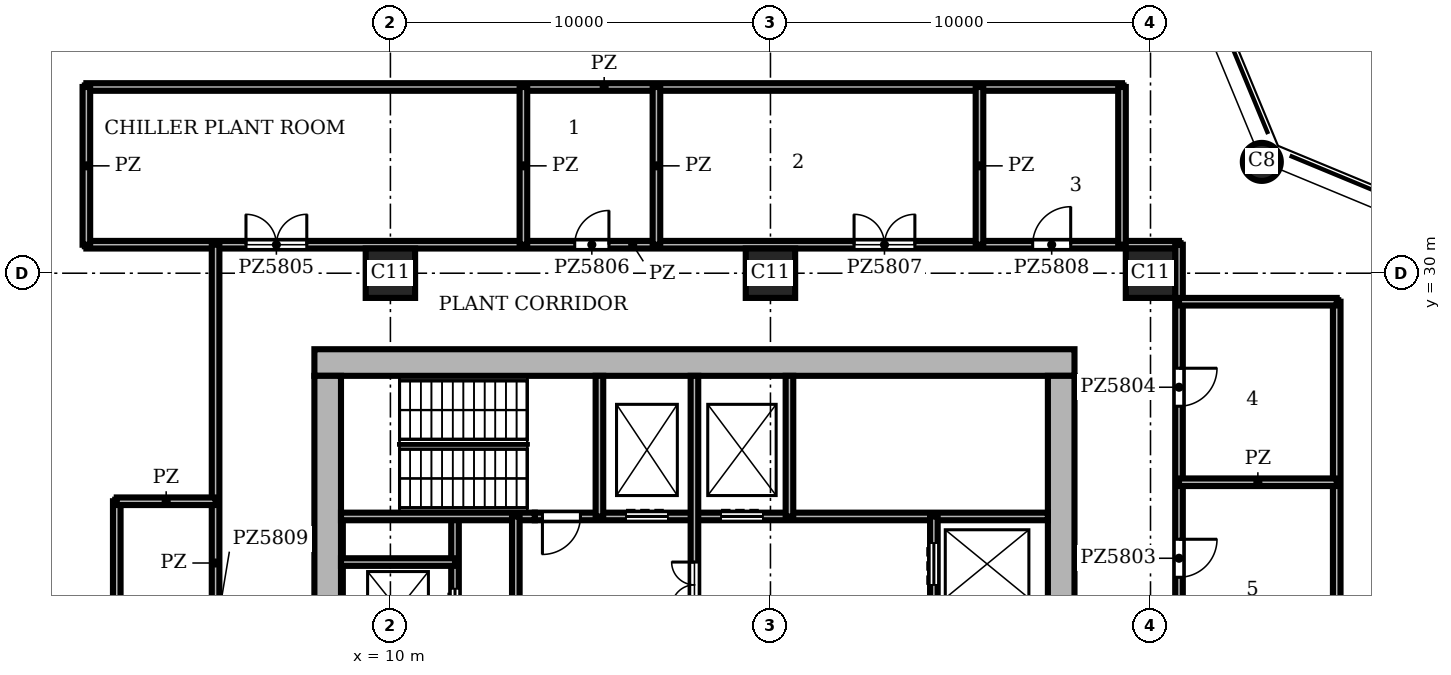
"""IFC4 building model, lengths in metres.
Left out: names, types, materials, properties, quantities, classifications, styles, units other than length and angle.
Written with IfcOpenShell. Run it as: python <this file> out.ifc"""

import sys

from ifc_helpers import new_model, si_unit, direction, frame, frame_2d, origin, origin_2d, place, context, subcontext, project, spatial, rectangle, circle, extrude, element, fill, save


model = new_model("IFC4")
c1 = context("Model", 3, precision=1e-05, world=origin(), true_north=direction((0.0, 1.0)))
c2 = subcontext(c1, "Body", "Model", "MODEL_VIEW")
j1 = project(units=[si_unit("LENGTHUNIT", "METRE"), si_unit("PLANEANGLEUNIT", "RADIAN")], contexts=[c1])
p1 = place(None, origin())
s1 = spatial("IfcSite", under=j1, at=p1, CompositionType="ELEMENT")
p2 = place(p1, origin())
s2 = spatial("IfcBuilding", under=s1, at=p2, CompositionType="ELEMENT")
p3 = place(p2, frame((0.0, 0.0, 237.0)))
s3 = spatial("IfcBuildingStorey", under=s2, at=p3, CompositionType="ELEMENT", Elevation=237.0)
p4 = place(p3, frame((32.929, 32.929, 0.0), z_axis=(0.0, 0.0, 1.0), x_axis=(1.0, 0.0, 0.0)))
e1 = element("IfcColumn", 1, at=p4, inside=s3, PredefinedType="COLUMN", context=c2, shape_type="SweptSolid", body=[
    extrude(circle(Radius=0.5, at=origin_2d()), origin(), (0.0, 0.0, 1.0), 9.0),
])
for number, where, z_axis, x_axis in (
    (2, (10.0, 30.0, 0.0), (0.0, 0.0, 1.0), (1.0, 0.0, 0.0)),
    (3, (20.0, 30.0, 0.0), (0.0, 0.0, 1.0), (1.0, 0.0, 0.0)),
    (4, (30.0, 30.0, 0.0), (0.0, 0.0, 1.0), (1.0, 0.0, 0.0)),
):
    element("IfcColumn", number, at=place(p3, frame(where, z_axis=z_axis, x_axis=x_axis)), inside=s3, PredefinedType="COLUMN", context=c2, shape_type="SweptSolid", body=[
        extrude(rectangle(XDim=1.3, YDim=1.3, at=origin_2d()), origin(), (0.0, 0.0, 1.0), 9.0),
    ])
p5 = place(p3, frame((27.65, 8.7, 0.0), z_axis=(0.0, 0.0, 1.0), x_axis=(0.0, 1.0, 0.0)))
e5 = element("IfcWall", 5, at=p5, inside=s3, PredefinedType="SHEAR", context=c2, shape_type="SweptSolid", body=[
    extrude(rectangle(XDim=18.6, YDim=0.7, at=frame_2d((9.3, 0.0))), origin(), (0.0, 0.0, 1.0), 9.0),
])
p6 = place(p5, frame((4.75, 0.0, 0.0)))
e6 = element("IfcOpeningElement", 6, at=p6, cuts=e5, PredefinedType="OPENING", context=c2, shape_type="SweptSolid", body=[
    extrude(rectangle(XDim=1.6, YDim=2.1, at=frame_2d((0.8, 1.05))), frame((0.0, 0.36, 0.0), z_axis=(0.0, -1.0, 0.0), x_axis=(1.0, 0.0, 0.0)), (0.0, 0.0, 1.0), 0.72),
])
p7 = place(p3, frame((28.0, 27.65, 0.0), z_axis=(0.0, 0.0, 1.0), x_axis=(-1.0, 0.0, 0.0)))
e7 = element("IfcWall", 7, at=p7, inside=s3, PredefinedType="SHEAR", context=c2, shape_type="SweptSolid", body=[
    extrude(rectangle(XDim=20.0, YDim=0.7, at=frame_2d((10.0, 0.0))), origin(), (0.0, 0.0, 1.0), 9.0),
])
p8 = place(p3, frame((8.35, 27.3, 0.0), z_axis=(0.0, 0.0, 1.0), x_axis=(0.0, -1.0, 0.0)))
e8 = element("IfcWall", 8, at=p8, inside=s3, PredefinedType="SHEAR", context=c2, shape_type="SweptSolid", body=[
    extrude(rectangle(XDim=18.6, YDim=0.7, at=frame_2d((9.3, 0.0))), origin(), (0.0, 0.0, 1.0), 9.0),
])
p9 = place(p3, frame((8.7, 22.4, 0.0), z_axis=(0.0, 0.0, 1.0), x_axis=(1.0, 0.0, 0.0)))
e9 = element("IfcWall", 9, at=p9, inside=s3, PredefinedType="SHEAR", context=c2, shape_type="SweptSolid", body=[
    extrude(rectangle(XDim=3.0, YDim=0.2, at=frame_2d((1.5, 0.0))), origin(), (0.0, 0.0, 1.0), 8.55),
])
p10 = place(p3, frame((8.7, 23.6, 0.0), z_axis=(0.0, 0.0, 1.0), x_axis=(1.0, 0.0, 0.0)))
e10 = element("IfcWall", 10, at=p10, inside=s3, PredefinedType="SHEAR", context=c2, shape_type="SweptSolid", body=[
    extrude(rectangle(XDim=5.1, YDim=0.2, at=frame_2d((2.55, 0.0))), origin(), (0.0, 0.0, 1.0), 8.55),
])
p11 = place(p3, frame((13.8, 23.6, 0.0), z_axis=(0.0, 0.0, 1.0), x_axis=(1.0, 0.0, 0.0)))
e11 = element("IfcWall", 11, at=p11, inside=s3, PredefinedType="SHEAR", context=c2, shape_type="SweptSolid", body=[
    extrude(rectangle(XDim=13.5, YDim=0.2, at=frame_2d((6.75, 0.0))), origin(), (0.0, 0.0, 1.0), 8.55),
])
p12 = place(p11, frame((2.4, 0.0, 0.0)))
e12 = element("IfcOpeningElement", 12, at=p12, cuts=e11, PredefinedType="OPENING", context=c2, shape_type="SweptSolid", body=[
    extrude(rectangle(XDim=1.1, YDim=2.1, at=frame_2d((0.55, 1.05))), frame((0.0, 0.11, 0.0), z_axis=(0.0, -1.0, 0.0), x_axis=(1.0, 0.0, 0.0)), (0.0, 0.0, 1.0), 0.22),
])
p13 = place(p11, frame((4.9, 0.0, 0.0)))
e13 = element("IfcOpeningElement", 13, at=p13, cuts=e11, PredefinedType="OPENING", context=c2, shape_type="SweptSolid", body=[
    extrude(rectangle(XDim=1.1, YDim=2.1, at=frame_2d((0.55, 1.05))), frame((0.0, 0.11, 0.0), z_axis=(0.0, -1.0, 0.0), x_axis=(1.0, 0.0, 0.0)), (0.0, 0.0, 1.0), 0.22),
])
p14 = place(p11, frame((0.2, 0.0, 0.0)))
e14 = element("IfcOpeningElement", 14, at=p14, cuts=e11, PredefinedType="OPENING", context=c2, shape_type="SweptSolid", body=[
    extrude(rectangle(XDim=1.0, YDim=2.1, at=frame_2d((0.5, 1.05))), frame((0.0, 0.11, 0.0), z_axis=(0.0, -1.0, 0.0), x_axis=(1.0, 0.0, 0.0)), (0.0, 0.0, 1.0), 0.22),
])
p15 = place(p3, frame((11.7, 12.4, 0.0), z_axis=(0.0, 0.0, 1.0), x_axis=(0.0, 1.0, 0.0)))
e15 = element("IfcWall", 15, at=p15, inside=s3, PredefinedType="SHEAR", context=c2, shape_type="SweptSolid", body=[
    extrude(rectangle(XDim=11.2, YDim=0.2, at=frame_2d((5.6, 0.0))), origin(), (0.0, 0.0, 1.0), 8.55),
])
p16 = place(p15, frame((0.7, 0.0, 0.0)))
e16 = element("IfcOpeningElement", 16, at=p16, cuts=e15, PredefinedType="OPENING", context=c2, shape_type="SweptSolid", body=[
    extrude(rectangle(XDim=1.1, YDim=2.1, at=frame_2d((0.55, 1.05))), frame((0.0, 0.11, 0.0), z_axis=(0.0, -1.0, 0.0), x_axis=(1.0, 0.0, 0.0)), (0.0, 0.0, 1.0), 0.22),
])
p17 = place(p15, frame((3.2, 0.0, 0.0)))
e17 = element("IfcOpeningElement", 17, at=p17, cuts=e15, PredefinedType="OPENING", context=c2, shape_type="SweptSolid", body=[
    extrude(rectangle(XDim=1.1, YDim=2.1, at=frame_2d((0.55, 1.05))), frame((0.0, 0.11, 0.0), z_axis=(0.0, -1.0, 0.0), x_axis=(1.0, 0.0, 0.0)), (0.0, 0.0, 1.0), 0.22),
])
p18 = place(p15, frame((5.7, 0.0, 0.0)))
e18 = element("IfcOpeningElement", 18, at=p18, cuts=e15, PredefinedType="OPENING", context=c2, shape_type="SweptSolid", body=[
    extrude(rectangle(XDim=1.1, YDim=2.1, at=frame_2d((0.55, 1.05))), frame((0.0, 0.11, 0.0), z_axis=(0.0, -1.0, 0.0), x_axis=(1.0, 0.0, 0.0)), (0.0, 0.0, 1.0), 0.22),
])
p19 = place(p15, frame((8.2, 0.0, 0.0)))
e19 = element("IfcOpeningElement", 19, at=p19, cuts=e15, PredefinedType="OPENING", context=c2, shape_type="SweptSolid", body=[
    extrude(rectangle(XDim=1.1, YDim=2.1, at=frame_2d((0.55, 1.05))), frame((0.0, 0.11, 0.0), z_axis=(0.0, -1.0, 0.0), x_axis=(1.0, 0.0, 0.0)), (0.0, 0.0, 1.0), 0.22),
])
p20 = place(p3, frame((13.3, 20.0, 0.0), z_axis=(0.0, 0.0, 1.0), x_axis=(0.0, 1.0, 0.0)))
e20 = element("IfcWall", 20, at=p20, inside=s3, PredefinedType="SHEAR", context=c2, shape_type="SweptSolid", body=[
    extrude(rectangle(XDim=3.6, YDim=0.2, at=frame_2d((1.8, 0.0))), origin(), (0.0, 0.0, 1.0), 8.55),
])
p21 = place(p3, frame((15.5, 23.6, 0.0), z_axis=(0.0, 0.0, 1.0), x_axis=(0.0, 1.0, 0.0)))
e21 = element("IfcWall", 21, at=p21, inside=s3, PredefinedType="SHEAR", context=c2, shape_type="SweptSolid", body=[
    extrude(rectangle(XDim=3.7, YDim=0.2, at=frame_2d((1.85, 0.0))), origin(), (0.0, 0.0, 1.0), 8.55),
])
p22 = place(p3, frame((18.0, 20.0, 0.0), z_axis=(0.0, 0.0, 1.0), x_axis=(0.0, 1.0, 0.0)))
e22 = element("IfcWall", 22, at=p22, inside=s3, PredefinedType="SHEAR", context=c2, shape_type="SweptSolid", body=[
    extrude(rectangle(XDim=7.3, YDim=0.2, at=frame_2d((3.65, 0.0))), origin(), (0.0, 0.0, 1.0), 8.55),
])
p23 = place(p22, frame((1.2, 0.0, 0.0)))
e23 = element("IfcOpeningElement", 23, at=p23, cuts=e22, PredefinedType="OPENING", context=c2, shape_type="SweptSolid", body=[
    extrude(rectangle(XDim=1.2, YDim=2.1, at=frame_2d((0.6, 1.05))), frame((0.0, 0.11, 0.0), z_axis=(0.0, -1.0, 0.0), x_axis=(1.0, 0.0, 0.0)), (0.0, 0.0, 1.0), 0.22),
])
p24 = place(p3, frame((20.5, 23.6, 0.0), z_axis=(0.0, 0.0, 1.0), x_axis=(0.0, 1.0, 0.0)))
e24 = element("IfcWall", 24, at=p24, inside=s3, PredefinedType="SHEAR", context=c2, shape_type="SweptSolid", body=[
    extrude(rectangle(XDim=3.7, YDim=0.2, at=frame_2d((1.85, 0.0))), origin(), (0.0, 0.0, 1.0), 8.55),
])
p25 = place(p3, frame((24.3, 16.1, 0.0), z_axis=(0.0, 0.0, 1.0), x_axis=(0.0, 1.0, 0.0)))
e25 = element("IfcWall", 25, at=p25, inside=s3, PredefinedType="SHEAR", context=c2, shape_type="SweptSolid", body=[
    extrude(rectangle(XDim=7.5, YDim=0.2, at=frame_2d((3.75, 0.0))), origin(), (0.0, 0.0, 1.0), 8.55),
])
p26 = place(p25, frame((5.7, 0.0, 0.0)))
e26 = element("IfcOpeningElement", 26, at=p26, cuts=e25, PredefinedType="OPENING", context=c2, shape_type="SweptSolid", body=[
    extrude(rectangle(XDim=1.1, YDim=2.1, at=frame_2d((0.55, 1.05))), frame((0.0, 0.11, 0.0), z_axis=(0.0, -1.0, 0.0), x_axis=(1.0, 0.0, 0.0)), (0.0, 0.0, 1.0), 0.22),
])
p27 = place(p3, frame((8.8, 22.2, 7.5), z_axis=(0.0, 0.0, 1.0), x_axis=(1.0, 0.0, 0.0)))
e27 = element("IfcWall", 27, at=p27, inside=s3, PredefinedType="SOLIDWALL", context=c2, shape_type="SweptSolid", body=[
    extrude(rectangle(XDim=2.8, YDim=0.2, at=frame_2d((1.4, 0.0))), origin(), (0.0, 0.0, 1.0), 1.5),
])
for number, where, z_axis, x_axis in (
    (28, (8.9, 20.2, 7.5), (0.0, 0.0, 1.0), (0.0, 1.0, 0.0)),
    (29, (11.5, 20.2, 7.5), (0.0, 0.0, 1.0), (0.0, 1.0, 0.0)),
):
    element("IfcWall", number, at=place(p3, frame(where, z_axis=z_axis, x_axis=x_axis)), inside=s3, PredefinedType="SOLIDWALL", context=c2, shape_type="SweptSolid", body=[
        extrude(rectangle(XDim=1.9, YDim=0.2, at=frame_2d((0.95, 0.0))), origin(), (0.0, 0.0, 1.0), 1.5),
    ])
p28 = place(p3, frame((2.0, 30.75, 0.0), z_axis=(0.0, 0.0, 1.0), x_axis=(1.0, 0.0, 0.0)))
e30 = element("IfcWall", 30, at=p28, inside=s3, PredefinedType="PARTITIONING", context=c2, shape_type="SweptSolid", body=[
    extrude(rectangle(XDim=28.75, YDim=0.2, at=frame_2d((14.375, 0.0))), origin(), (0.0, 0.0, 1.0), 8.55),
])
p29 = place(p28, frame((4.2, 0.0, 0.0)))
e31 = element("IfcOpeningElement", 31, at=p29, cuts=e30, PredefinedType="OPENING", context=c2, shape_type="SweptSolid", body=[
    extrude(rectangle(XDim=1.6, YDim=2.1, at=frame_2d((0.8, 1.05))), frame((0.0, 0.11, 0.0), z_axis=(0.0, -1.0, 0.0), x_axis=(1.0, 0.0, 0.0)), (0.0, 0.0, 1.0), 0.22),
])
p30 = place(p28, frame((12.85, 0.0, 0.0)))
e32 = element("IfcOpeningElement", 32, at=p30, cuts=e30, PredefinedType="OPENING", context=c2, shape_type="SweptSolid", body=[
    extrude(rectangle(XDim=0.9, YDim=2.1, at=frame_2d((0.45, 1.05))), frame((0.0, 0.11, 0.0), z_axis=(0.0, -1.0, 0.0), x_axis=(1.0, 0.0, 0.0)), (0.0, 0.0, 1.0), 0.22),
])
p31 = place(p28, frame((20.2, 0.0, 0.0)))
e33 = element("IfcOpeningElement", 33, at=p31, cuts=e30, PredefinedType="OPENING", context=c2, shape_type="SweptSolid", body=[
    extrude(rectangle(XDim=1.6, YDim=2.1, at=frame_2d((0.8, 1.05))), frame((0.0, 0.11, 0.0), z_axis=(0.0, -1.0, 0.0), x_axis=(1.0, 0.0, 0.0)), (0.0, 0.0, 1.0), 0.22),
])
p32 = place(p28, frame((24.9, 0.0, 0.0)))
e34 = element("IfcOpeningElement", 34, at=p32, cuts=e30, PredefinedType="OPENING", context=c2, shape_type="SweptSolid", body=[
    extrude(rectangle(XDim=1.0, YDim=2.1, at=frame_2d((0.5, 1.05))), frame((0.0, 0.11, 0.0), z_axis=(0.0, -1.0, 0.0), x_axis=(1.0, 0.0, 0.0)), (0.0, 0.0, 1.0), 0.22),
])
p33 = place(p3, frame((2.0, 34.9, 0.0), z_axis=(0.0, 0.0, 1.0), x_axis=(1.0, 0.0, 0.0)))
e35 = element("IfcWall", 35, at=p33, inside=s3, PredefinedType="PARTITIONING", context=c2, shape_type="SweptSolid", body=[
    extrude(rectangle(XDim=27.25, YDim=0.2, at=frame_2d((13.625, 0.0))), origin(), (0.0, 0.0, 1.0), 8.55),
])
p34 = place(p3, frame((2.8, 24.0, 0.0), z_axis=(0.0, 0.0, 1.0), x_axis=(1.0, 0.0, 0.0)))
e36 = element("IfcWall", 36, at=p34, inside=s3, PredefinedType="PARTITIONING", context=c2, shape_type="SweptSolid", body=[
    extrude(rectangle(XDim=2.6, YDim=0.2, at=frame_2d((1.3, 0.0))), origin(), (0.0, 0.0, 1.0), 8.55),
])
for number, where, z_axis, x_axis in (
    (37, (30.75, 24.5, 0.0), (0.0, 0.0, 1.0), (1.0, 0.0, 0.0)),
    (38, (30.75, 29.25, 0.0), (0.0, 0.0, 1.0), (1.0, 0.0, 0.0)),
    (39, (2.0, 30.75, 0.0), (0.0, 0.0, 1.0), (0.0, 1.0, 0.0)),
):
    element("IfcWall", number, at=place(p3, frame(where, z_axis=z_axis, x_axis=x_axis)), inside=s3, PredefinedType="PARTITIONING", context=c2, shape_type="SweptSolid", body=[
        extrude(rectangle(XDim=4.15, YDim=0.2, at=frame_2d((2.075, 0.0))), origin(), (0.0, 0.0, 1.0), 8.55),
    ])
p35 = place(p3, frame((2.8, 17.0, 0.0), z_axis=(0.0, 0.0, 1.0), x_axis=(0.0, 1.0, 0.0)))
e40 = element("IfcWall", 40, at=p35, inside=s3, PredefinedType="PARTITIONING", context=c2, shape_type="SweptSolid", body=[
    extrude(rectangle(XDim=7.0, YDim=0.2, at=frame_2d((3.5, 0.0))), origin(), (0.0, 0.0, 1.0), 8.55),
])
p36 = place(p3, frame((5.4, 14.0, 0.0), z_axis=(0.0, 0.0, 1.0), x_axis=(0.0, 1.0, 0.0)))
e41 = element("IfcWall", 41, at=p36, inside=s3, PredefinedType="PARTITIONING", context=c2, shape_type="SweptSolid", body=[
    extrude(rectangle(XDim=16.75, YDim=0.2, at=frame_2d((8.375, 0.0))), origin(), (0.0, 0.0, 1.0), 8.55),
])
p37 = place(p36, frame((6.0, 0.0, 0.0)))
e42 = element("IfcOpeningElement", 42, at=p37, cuts=e41, PredefinedType="OPENING", context=c2, shape_type="SweptSolid", body=[
    extrude(rectangle(XDim=1.0, YDim=2.1, at=frame_2d((0.5, 1.05))), frame((0.0, 0.11, 0.0), z_axis=(0.0, -1.0, 0.0), x_axis=(1.0, 0.0, 0.0)), (0.0, 0.0, 1.0), 0.22),
])
for number, where, z_axis, x_axis in (
    (43, (13.5, 30.75, 0.0), (0.0, 0.0, 1.0), (0.0, 1.0, 0.0)),
    (44, (17.0, 30.75, 0.0), (0.0, 0.0, 1.0), (0.0, 1.0, 0.0)),
    (45, (25.5, 30.75, 0.0), (0.0, 0.0, 1.0), (0.0, 1.0, 0.0)),
    (46, (29.25, 30.75, 0.0), (0.0, 0.0, 1.0), (0.0, 1.0, 0.0)),
):
    element("IfcWall", number, at=place(p3, frame(where, z_axis=z_axis, x_axis=x_axis)), inside=s3, PredefinedType="PARTITIONING", context=c2, shape_type="SweptSolid", body=[
        extrude(rectangle(XDim=4.15, YDim=0.2, at=frame_2d((2.075, 0.0))), origin(), (0.0, 0.0, 1.0), 8.55),
    ])
p38 = place(p3, frame((30.75, 8.1, 0.0), z_axis=(0.0, 0.0, 1.0), x_axis=(0.0, 1.0, 0.0)))
e47 = element("IfcWall", 47, at=p38, inside=s3, PredefinedType="PARTITIONING", context=c2, shape_type="SweptSolid", body=[
    extrude(rectangle(XDim=22.65, YDim=0.2, at=frame_2d((11.325, 0.0))), origin(), (0.0, 0.0, 1.0), 8.55),
])
p39 = place(p38, frame((3.6, 0.0, 0.0)))
e48 = element("IfcOpeningElement", 48, at=p39, cuts=e47, PredefinedType="OPENING", context=c2, shape_type="SweptSolid", body=[
    extrude(rectangle(XDim=1.0, YDim=2.1, at=frame_2d((0.5, 1.05))), frame((0.0, 0.11, 0.0), z_axis=(0.0, -1.0, 0.0), x_axis=(1.0, 0.0, 0.0)), (0.0, 0.0, 1.0), 0.22),
])
p40 = place(p38, frame((7.7, 0.0, 0.0)))
e49 = element("IfcOpeningElement", 49, at=p40, cuts=e47, PredefinedType="OPENING", context=c2, shape_type="SweptSolid", body=[
    extrude(rectangle(XDim=1.2, YDim=2.1, at=frame_2d((0.6, 1.05))), frame((0.0, 0.11, 0.0), z_axis=(0.0, -1.0, 0.0), x_axis=(1.0, 0.0, 0.0)), (0.0, 0.0, 1.0), 0.22),
])
p41 = place(p38, frame((13.9, 0.0, 0.0)))
e50 = element("IfcOpeningElement", 50, at=p41, cuts=e47, PredefinedType="OPENING", context=c2, shape_type="SweptSolid", body=[
    extrude(rectangle(XDim=1.0, YDim=2.1, at=frame_2d((0.5, 1.05))), frame((0.0, 0.11, 0.0), z_axis=(0.0, -1.0, 0.0), x_axis=(1.0, 0.0, 0.0)), (0.0, 0.0, 1.0), 0.22),
])
p42 = place(p38, frame((18.4, 0.0, 0.0)))
e51 = element("IfcOpeningElement", 51, at=p42, cuts=e47, PredefinedType="OPENING", context=c2, shape_type="SweptSolid", body=[
    extrude(rectangle(XDim=1.0, YDim=2.1, at=frame_2d((0.5, 1.05))), frame((0.0, 0.11, 0.0), z_axis=(0.0, -1.0, 0.0), x_axis=(1.0, 0.0, 0.0)), (0.0, 0.0, 1.0), 0.22),
])
p43 = place(p3, frame((34.9, 8.1, 0.0), z_axis=(0.0, 0.0, 1.0), x_axis=(0.0, 1.0, 0.0)))
e52 = element("IfcWall", 52, at=p43, inside=s3, PredefinedType="PARTITIONING", context=c2, shape_type="SweptSolid", body=[
    extrude(rectangle(XDim=21.15, YDim=0.2, at=frame_2d((10.575, 0.0))), origin(), (0.0, 0.0, 1.0), 8.55),
])
p44 = place(p19, origin())
e53 = element("IfcDoor", 53, at=p44, inside=s3, OperationType="DOUBLE_DOOR_SLIDING", PredefinedType="DOOR", context=c2, shape_type="SweptSolid", body=[
    extrude(rectangle(XDim=1.1, YDim=2.1, at=frame_2d((0.55, 1.05))), frame((0.0, 0.025, 0.0), z_axis=(0.0, -1.0, 0.0), x_axis=(1.0, 0.0, 0.0)), (0.0, 0.0, 1.0), 0.05),
])
fill(e19, e53)
p45 = place(p26, origin())
e54 = element("IfcDoor", 54, at=p45, inside=s3, OperationType="DOUBLE_DOOR_SLIDING", PredefinedType="DOOR", context=c2, shape_type="SweptSolid", body=[
    extrude(rectangle(XDim=1.1, YDim=2.1, at=frame_2d((0.55, 1.05))), frame((0.0, 0.025, 0.0), z_axis=(0.0, -1.0, 0.0), x_axis=(1.0, 0.0, 0.0)), (0.0, 0.0, 1.0), 0.05),
])
fill(e26, e54)
p46 = place(p12, origin())
e55 = element("IfcDoor", 55, at=p46, inside=s3, OperationType="DOUBLE_DOOR_SLIDING", PredefinedType="DOOR", context=c2, shape_type="SweptSolid", body=[
    extrude(rectangle(XDim=1.1, YDim=2.1, at=frame_2d((0.55, 1.05))), frame((0.0, 0.025, 0.0), z_axis=(0.0, -1.0, 0.0), x_axis=(1.0, 0.0, 0.0)), (0.0, 0.0, 1.0), 0.05),
])
fill(e12, e55)
p47 = place(p13, origin())
e56 = element("IfcDoor", 56, at=p47, inside=s3, OperationType="DOUBLE_DOOR_SLIDING", PredefinedType="DOOR", context=c2, shape_type="SweptSolid", body=[
    extrude(rectangle(XDim=1.1, YDim=2.1, at=frame_2d((0.55, 1.05))), frame((0.0, 0.025, 0.0), z_axis=(0.0, -1.0, 0.0), x_axis=(1.0, 0.0, 0.0)), (0.0, 0.0, 1.0), 0.05),
])
fill(e13, e56)
p48 = place(p14, frame((1.0, 0.0, 0.0), z_axis=(0.0, 0.0, 1.0), x_axis=(-1.0, 0.0, 0.0)))
e57 = element("IfcDoor", 57, at=p48, inside=s3, OperationType="SINGLE_SWING_RIGHT", PredefinedType="DOOR", context=c2, shape_type="SweptSolid", body=[
    extrude(rectangle(XDim=1.0, YDim=2.1, at=frame_2d((0.5, 1.05))), frame((0.0, 0.025, 0.0), z_axis=(0.0, -1.0, 0.0), x_axis=(1.0, 0.0, 0.0)), (0.0, 0.0, 1.0), 0.05),
])
fill(e14, e57)
p49 = place(p23, origin())
e58 = element("IfcDoor", 58, at=p49, inside=s3, OperationType="DOUBLE_DOOR_SINGLE_SWING", PredefinedType="DOOR", context=c2, shape_type="SweptSolid", body=[
    extrude(rectangle(XDim=1.2, YDim=2.1, at=frame_2d((0.6, 1.05))), frame((0.0, 0.025, 0.0), z_axis=(0.0, -1.0, 0.0), x_axis=(1.0, 0.0, 0.0)), (0.0, 0.0, 1.0), 0.05),
])
fill(e23, e58)
p50 = place(p41, frame((1.0, 0.0, 0.0), z_axis=(0.0, 0.0, 1.0), x_axis=(-1.0, 0.0, 0.0)))
e59 = element("IfcDoor", 59, at=p50, inside=s3, OperationType="SINGLE_SWING_LEFT", PredefinedType="DOOR", context=c2, shape_type="SweptSolid", body=[
    extrude(rectangle(XDim=1.0, YDim=2.1, at=frame_2d((0.5, 1.05))), frame((0.0, 0.025, 0.0), z_axis=(0.0, -1.0, 0.0), x_axis=(1.0, 0.0, 0.0)), (0.0, 0.0, 1.0), 0.05),
])
fill(e50, e59)
p51 = place(p42, frame((1.0, 0.0, 0.0), z_axis=(0.0, 0.0, 1.0), x_axis=(-1.0, 0.0, 0.0)))
e60 = element("IfcDoor", 60, at=p51, inside=s3, OperationType="SINGLE_SWING_LEFT", PredefinedType="DOOR", context=c2, shape_type="SweptSolid", body=[
    extrude(rectangle(XDim=1.0, YDim=2.1, at=frame_2d((0.5, 1.05))), frame((0.0, 0.025, 0.0), z_axis=(0.0, -1.0, 0.0), x_axis=(1.0, 0.0, 0.0)), (0.0, 0.0, 1.0), 0.05),
])
fill(e51, e60)
p52 = place(p29, origin())
e61 = element("IfcDoor", 61, at=p52, inside=s3, OperationType="DOUBLE_DOOR_DOUBLE_SWING", PredefinedType="DOOR", context=c2, shape_type="SweptSolid", body=[
    extrude(rectangle(XDim=1.6, YDim=2.1, at=frame_2d((0.8, 1.05))), frame((0.0, 0.025, 0.0), z_axis=(0.0, -1.0, 0.0), x_axis=(1.0, 0.0, 0.0)), (0.0, 0.0, 1.0), 0.05),
])
fill(e31, e61)
p53 = place(p30, origin())
e62 = element("IfcDoor", 62, at=p53, inside=s3, OperationType="SINGLE_SWING_RIGHT", PredefinedType="DOOR", context=c2, shape_type="SweptSolid", body=[
    extrude(rectangle(XDim=0.9, YDim=2.1, at=frame_2d((0.45, 1.05))), frame((0.0, 0.025, 0.0), z_axis=(0.0, -1.0, 0.0), x_axis=(1.0, 0.0, 0.0)), (0.0, 0.0, 1.0), 0.05),
])
fill(e32, e62)
p54 = place(p31, origin())
e63 = element("IfcDoor", 63, at=p54, inside=s3, OperationType="DOUBLE_DOOR_DOUBLE_SWING", PredefinedType="DOOR", context=c2, shape_type="SweptSolid", body=[
    extrude(rectangle(XDim=1.6, YDim=2.1, at=frame_2d((0.8, 1.05))), frame((0.0, 0.025, 0.0), z_axis=(0.0, -1.0, 0.0), x_axis=(1.0, 0.0, 0.0)), (0.0, 0.0, 1.0), 0.05),
])
fill(e33, e63)
p55 = place(p32, origin())
e64 = element("IfcDoor", 64, at=p55, inside=s3, OperationType="SINGLE_SWING_RIGHT", PredefinedType="DOOR", context=c2, shape_type="SweptSolid", body=[
    extrude(rectangle(XDim=1.0, YDim=2.1, at=frame_2d((0.5, 1.05))), frame((0.0, 0.025, 0.0), z_axis=(0.0, -1.0, 0.0), x_axis=(1.0, 0.0, 0.0)), (0.0, 0.0, 1.0), 0.05),
])
fill(e34, e64)
save(model, sys.argv[1])
